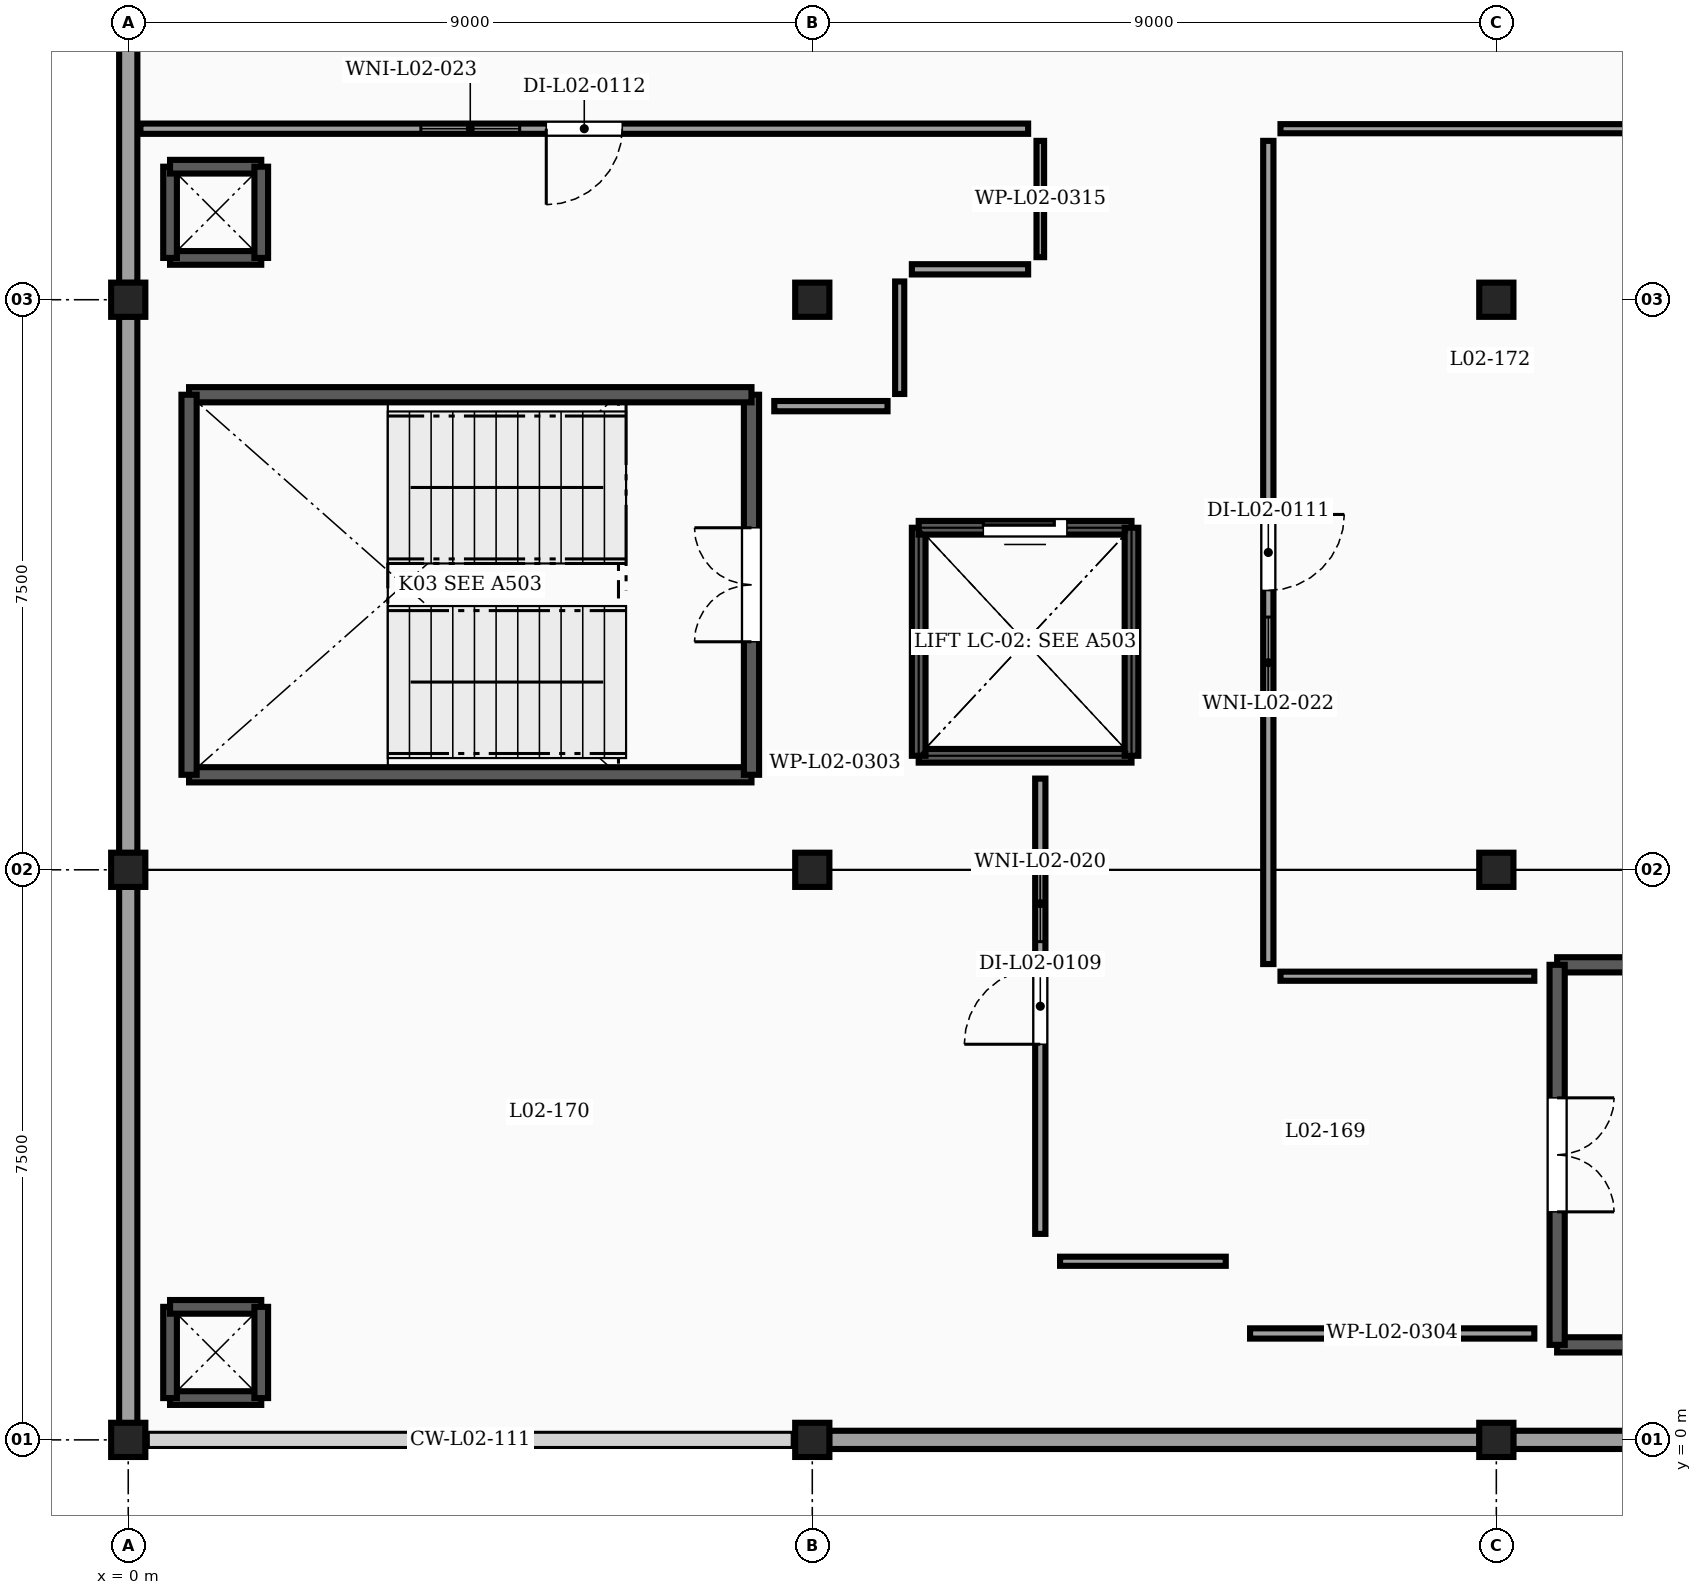
"""IFC4 building model, lengths in metres.
Left out: names, types, materials, properties, quantities, classifications, styles, units other than length and angle.
Written with IfcOpenShell. Run it as: python <this file> out.ifc"""

import sys

from ifc_helpers import new_model, si_unit, direction, frame, frame_2d, origin, origin_2d, place, context, subcontext, project, spatial, rectangle, extrude, element, fill, save


model = new_model("IFC4")
c1 = context("Model", 3, precision=1e-05, world=origin(), true_north=direction((0.0, 1.0)))
c2 = subcontext(c1, "Body", "Model", "MODEL_VIEW")
j1 = project(units=[si_unit("LENGTHUNIT", "METRE"), si_unit("PLANEANGLEUNIT", "RADIAN")], contexts=[c1])
p1 = place(None, origin())
s1 = spatial("IfcSite", under=j1, at=p1, CompositionType="ELEMENT")
p2 = place(p1, origin())
s2 = spatial("IfcBuilding", under=s1, at=p2, CompositionType="ELEMENT")
p3 = place(p2, frame((0.0, 0.0, 8.5)))
s3 = spatial("IfcBuildingStorey", under=s2, at=p3, CompositionType="ELEMENT", Elevation=8.5)
for number, where, z_axis, x_axis in (
    (1, (0.0, 0.0, 0.0), (0.0, 0.0, 1.0), (1.0, 0.0, 0.0)),
    (2, (9.0, 0.0, 0.0), (0.0, 0.0, 1.0), (1.0, 0.0, 0.0)),
    (3, (18.0, 0.0, 0.0), (0.0, 0.0, 1.0), (1.0, 0.0, 0.0)),
    (4, (0.0, 7.5, 0.0), (0.0, 0.0, 1.0), (1.0, 0.0, 0.0)),
    (5, (9.0, 7.5, 0.0), (0.0, 0.0, 1.0), (1.0, 0.0, 0.0)),
    (6, (18.0, 7.5, 0.0), (0.0, 0.0, 1.0), (1.0, 0.0, 0.0)),
    (7, (0.0, 15.0, 0.0), (0.0, 0.0, 1.0), (1.0, 0.0, 0.0)),
    (8, (9.0, 15.0, 0.0), (0.0, 0.0, 1.0), (1.0, 0.0, 0.0)),
    (9, (18.0, 15.0, 0.0), (0.0, 0.0, 1.0), (1.0, 0.0, 0.0)),
):
    element("IfcColumn", number, at=place(p3, frame(where, z_axis=z_axis, x_axis=x_axis)), inside=s3, PredefinedType="COLUMN", context=c2, shape_type="SweptSolid", body=[
        extrude(rectangle(XDim=0.45, YDim=0.45, at=origin_2d()), origin(), (0.0, 0.0, 1.0), 3.8),
    ])
for number, where, z_axis, x_axis in (
    (10, (26.779, 0.0, 0.0), (0.0, 0.0, 1.0), (-1.0, 0.0, 0.0)),
    (11, (17.779, 0.0, 0.0), (0.0, 0.0, 1.0), (-1.0, 0.0, 0.0)),
):
    element("IfcWall", number, at=place(p3, frame(where, z_axis=z_axis, x_axis=x_axis)), inside=s3, PredefinedType="SOLIDWALL", context=c2, shape_type="SweptSolid", body=[
        extrude(rectangle(XDim=8.558, YDim=0.24, at=frame_2d((4.279, 0.0))), origin(), (0.0, 0.0, 1.0), 3.23),
    ])
for number, where, z_axis, x_axis in (
    (12, (0.0, 0.221, 0.0), (0.0, 0.0, 1.0), (0.0, 1.0, 0.0)),
    (13, (0.0, 7.721, 0.0), (0.0, 0.0, 1.0), (0.0, 1.0, 0.0)),
    (14, (0.0, 15.221, 0.0), (0.0, 0.0, 1.0), (0.0, 1.0, 0.0)),
):
    element("IfcWall", number, at=place(p3, frame(where, z_axis=z_axis, x_axis=x_axis)), inside=s3, PredefinedType="SOLIDWALL", context=c2, shape_type="SweptSolid", body=[
        extrude(rectangle(XDim=7.058, YDim=0.24, at=frame_2d((3.529, 0.0))), origin(), (0.0, 0.0, 1.0), 3.23),
    ])
for number, where, z_axis, x_axis in (
    (15, (1.75, 0.55, 0.0), (0.0, 0.0, 1.0), (-1.0, 0.0, 0.0)),
    (16, (0.55, 0.55, 0.0), (0.0, 0.0, 1.0), (0.0, 1.0, 0.0)),
    (17, (0.55, 1.75, 0.0), (0.0, 0.0, 1.0), (1.0, 0.0, 0.0)),
    (18, (1.75, 1.75, 0.0), (0.0, 0.0, 1.0), (0.0, -1.0, 0.0)),
    (19, (1.75, 15.55, 0.0), (0.0, 0.0, 1.0), (-1.0, 0.0, 0.0)),
    (20, (0.55, 15.55, 0.0), (0.0, 0.0, 1.0), (0.0, 1.0, 0.0)),
    (21, (0.55, 16.75, 0.0), (0.0, 0.0, 1.0), (1.0, 0.0, 0.0)),
    (22, (1.75, 16.75, 0.0), (0.0, 0.0, 1.0), (0.0, -1.0, 0.0)),
):
    element("IfcWall", number, at=place(p3, frame(where, z_axis=z_axis, x_axis=x_axis)), inside=s3, PredefinedType="SHEAR", context=c2, shape_type="SweptSolid", body=[
        extrude(rectangle(XDim=1.2, YDim=0.18, at=frame_2d((0.6, 0.0))), origin(), (0.0, 0.0, 1.0), 3.59),
    ])
p4 = place(p3, frame((0.8, 8.75, 0.0), z_axis=(0.0, 0.0, 1.0), x_axis=(1.0, 0.0, 0.0)))
e23 = element("IfcWall", 23, at=p4, inside=s3, PredefinedType="SHEAR", context=c2, shape_type="SweptSolid", body=[
    extrude(rectangle(XDim=7.4, YDim=0.2, at=frame_2d((3.7, 0.0))), origin(), (0.0, 0.0, 1.0), 3.59),
])
p5 = place(p3, frame((8.2, 8.75, 0.0), z_axis=(0.0, 0.0, 1.0), x_axis=(0.0, 1.0, 0.0)))
e24 = element("IfcWall", 24, at=p5, inside=s3, PredefinedType="SHEAR", context=c2, shape_type="SweptSolid", body=[
    extrude(rectangle(XDim=5.0, YDim=0.2, at=frame_2d((2.5, 0.0))), origin(), (0.0, 0.0, 1.0), 3.59),
])
p6 = place(p5, frame((1.75, 0.0, 0.0)))
e25 = element("IfcOpeningElement", 25, at=p6, cuts=e24, PredefinedType="OPENING", context=c2, shape_type="SweptSolid", body=[
    extrude(rectangle(XDim=1.5, YDim=2.15, at=frame_2d((0.75, 1.075))), frame((0.0, 0.11, 0.0), z_axis=(0.0, -1.0, 0.0), x_axis=(1.0, 0.0, 0.0)), (0.0, 0.0, 1.0), 0.22),
])
p7 = place(p3, frame((8.2, 13.75, 0.0), z_axis=(0.0, 0.0, 1.0), x_axis=(-1.0, 0.0, 0.0)))
e26 = element("IfcWall", 26, at=p7, inside=s3, PredefinedType="SHEAR", context=c2, shape_type="SweptSolid", body=[
    extrude(rectangle(XDim=7.4, YDim=0.2, at=frame_2d((3.7, 0.0))), origin(), (0.0, 0.0, 1.0), 3.59),
])
p8 = place(p3, frame((0.8, 13.75, 0.0), z_axis=(0.0, 0.0, 1.0), x_axis=(0.0, -1.0, 0.0)))
e27 = element("IfcWall", 27, at=p8, inside=s3, PredefinedType="SHEAR", context=c2, shape_type="SweptSolid", body=[
    extrude(rectangle(XDim=5.0, YDim=0.2, at=frame_2d((2.5, 0.0))), origin(), (0.0, 0.0, 1.0), 3.59),
])
for number, where, z_axis, x_axis in (
    (28, (18.8, 1.25, 0.0), (0.0, 0.0, 1.0), (1.0, 0.0, 0.0)),
    (29, (26.2, 6.25, 0.0), (0.0, 0.0, 1.0), (-1.0, 0.0, 0.0)),
):
    element("IfcWall", number, at=place(p3, frame(where, z_axis=z_axis, x_axis=x_axis)), inside=s3, PredefinedType="SHEAR", context=c2, shape_type="SweptSolid", body=[
        extrude(rectangle(XDim=7.4, YDim=0.2, at=frame_2d((3.7, 0.0))), origin(), (0.0, 0.0, 1.0), 3.59),
    ])
p9 = place(p3, frame((18.8, 6.25, 0.0), z_axis=(0.0, 0.0, 1.0), x_axis=(0.0, -1.0, 0.0)))
e30 = element("IfcWall", 30, at=p9, inside=s3, PredefinedType="SHEAR", context=c2, shape_type="SweptSolid", body=[
    extrude(rectangle(XDim=5.0, YDim=0.2, at=frame_2d((2.5, 0.0))), origin(), (0.0, 0.0, 1.0), 3.59),
])
p10 = place(p9, frame((1.75, 0.0, 0.0)))
e31 = element("IfcOpeningElement", 31, at=p10, cuts=e30, PredefinedType="OPENING", context=c2, shape_type="SweptSolid", body=[
    extrude(rectangle(XDim=1.5, YDim=2.15, at=frame_2d((0.75, 1.075))), frame((0.0, 0.11, 0.0), z_axis=(0.0, -1.0, 0.0), x_axis=(1.0, 0.0, 0.0)), (0.0, 0.0, 1.0), 0.22),
])
p11 = place(p3, frame((13.2, 9.0, 0.0), z_axis=(0.0, 0.0, 1.0), x_axis=(-1.0, 0.0, 0.0)))
e32 = element("IfcWall", 32, at=p11, inside=s3, PredefinedType="SHEAR", context=c2, shape_type="SweptSolid", body=[
    extrude(rectangle(XDim=2.8, YDim=0.18, at=frame_2d((1.4, 0.0))), origin(), (0.0, 0.0, 1.0), 3.59),
])
p12 = place(p3, frame((10.4, 9.0, 0.0), z_axis=(0.0, 0.0, 1.0), x_axis=(0.0, 1.0, 0.0)))
e33 = element("IfcWall", 33, at=p12, inside=s3, PredefinedType="SHEAR", context=c2, shape_type="SweptSolid", body=[
    extrude(rectangle(XDim=3.0, YDim=0.18, at=frame_2d((1.5, 0.0))), origin(), (0.0, 0.0, 1.0), 3.59),
])
p13 = place(p3, frame((10.4, 12.0, 0.0), z_axis=(0.0, 0.0, 1.0), x_axis=(1.0, 0.0, 0.0)))
e34 = element("IfcWall", 34, at=p13, inside=s3, PredefinedType="SHEAR", context=c2, shape_type="SweptSolid", body=[
    extrude(rectangle(XDim=2.8, YDim=0.18, at=frame_2d((1.4, 0.0))), origin(), (0.0, 0.0, 1.0), 3.59),
])
p14 = place(p13, frame((0.85, 0.0, 0.0)))
e35 = element("IfcOpeningElement", 35, at=p14, cuts=e34, PredefinedType="OPENING", context=c2, shape_type="SweptSolid", body=[
    extrude(rectangle(XDim=1.1, YDim=2.15, at=frame_2d((0.55, 1.075))), frame((0.0, 0.1, 0.0), z_axis=(0.0, -1.0, 0.0), x_axis=(1.0, 0.0, 0.0)), (0.0, 0.0, 1.0), 0.2),
])
p15 = place(p3, frame((13.2, 12.0, 0.0), z_axis=(0.0, 0.0, 1.0), x_axis=(0.0, -1.0, 0.0)))
e36 = element("IfcWall", 36, at=p15, inside=s3, PredefinedType="SHEAR", context=c2, shape_type="SweptSolid", body=[
    extrude(rectangle(XDim=3.0, YDim=0.18, at=frame_2d((1.5, 0.0))), origin(), (0.0, 0.0, 1.0), 3.59),
])
p16 = place(p3, frame((10.1, 8.9, 0.0), z_axis=(0.0, 0.0, 1.0), x_axis=(-1.0, 0.0, 0.0)))
e37 = element("IfcWall", 37, at=p16, inside=s3, PredefinedType="PARTITIONING", context=c2, shape_type="SweptSolid", body=[
    extrude(rectangle(XDim=1.6, YDim=0.12, at=frame_2d((0.8, 0.0))), origin(), (0.0, 0.0, 1.0), 3.59),
])
p17 = place(p3, frame((18.5, 1.4, 0.0), z_axis=(0.0, 0.0, 1.0), x_axis=(-1.0, 0.0, 0.0)))
e38 = element("IfcWall", 38, at=p17, inside=s3, PredefinedType="PARTITIONING", context=c2, shape_type="SweptSolid", body=[
    extrude(rectangle(XDim=3.74, YDim=0.135, at=frame_2d((1.87, 0.0))), origin(), (0.0, 0.0, 1.0), 3.59),
])
p18 = place(p3, frame((14.44, 2.35, 0.0), z_axis=(0.0, 0.0, 1.0), x_axis=(-1.0, 0.0, 0.0)))
e39 = element("IfcWall", 39, at=p18, inside=s3, PredefinedType="PARTITIONING", context=c2, shape_type="SweptSolid", body=[
    extrude(rectangle(XDim=2.18, YDim=0.12, at=frame_2d((1.09, 0.0))), origin(), (0.0, 0.0, 1.0), 3.59),
])
p19 = place(p3, frame((12.0, 2.71, 0.0), z_axis=(0.0, 0.0, 1.0), x_axis=(0.0, 1.0, 0.0)))
e40 = element("IfcWall", 40, at=p19, inside=s3, PredefinedType="PARTITIONING", context=c2, shape_type="SweptSolid", body=[
    extrude(rectangle(XDim=5.99, YDim=0.135, at=frame_2d((2.995, 0.0))), origin(), (0.0, 0.0, 1.0), 3.182),
])
p20 = place(p19, frame((2.495, 0.0, 0.0)))
e41 = element("IfcOpeningElement", 41, at=p20, cuts=e40, PredefinedType="OPENING", context=c2, shape_type="SweptSolid", body=[
    extrude(rectangle(XDim=1.0, YDim=2.15, at=frame_2d((0.5, 1.075))), frame((0.0, 0.077, 0.0), z_axis=(0.0, -1.0, 0.0), x_axis=(1.0, 0.0, 0.0)), (0.0, 0.0, 1.0), 0.155),
])
p21 = place(p19, frame((3.845, 0.0, 1.02)))
e42 = element("IfcOpeningElement", 42, at=p21, cuts=e40, PredefinedType="OPENING", context=c2, shape_type="SweptSolid", body=[
    extrude(rectangle(XDim=1.0, YDim=1.08, at=frame_2d((0.5, 0.54))), frame((0.0, 0.077, 0.0), z_axis=(0.0, -1.0, 0.0), x_axis=(1.0, 0.0, 0.0)), (0.0, 0.0, 1.0), 0.155),
])
p22 = place(p3, frame((20.84, 17.25, 0.0), z_axis=(0.0, 0.0, 1.0), x_axis=(-1.0, 0.0, 0.0)))
e43 = element("IfcWall", 43, at=p22, inside=s3, PredefinedType="PARTITIONING", context=c2, shape_type="SweptSolid", body=[
    extrude(rectangle(XDim=5.68, YDim=0.12, at=frame_2d((2.84, 0.0))), origin(), (0.0, 0.0, 1.0), 3.59),
])
p23 = place(p3, frame((15.0, 17.09, 0.0), z_axis=(0.0, 0.0, 1.0), x_axis=(0.0, -1.0, 0.0)))
e44 = element("IfcWall", 44, at=p23, inside=s3, PredefinedType="PARTITIONING", context=c2, shape_type="SweptSolid", body=[
    extrude(rectangle(XDim=10.83, YDim=0.135, at=frame_2d((5.415, 0.0))), origin(), (0.0, 0.0, 1.0), 3.182),
])
p24 = place(p23, frame((4.915, 0.0, 0.0)))
e45 = element("IfcOpeningElement", 45, at=p24, cuts=e44, PredefinedType="OPENING", context=c2, shape_type="SweptSolid", body=[
    extrude(rectangle(XDim=1.0, YDim=2.15, at=frame_2d((0.5, 1.075))), frame((0.0, 0.077, 0.0), z_axis=(0.0, -1.0, 0.0), x_axis=(1.0, 0.0, 0.0)), (0.0, 0.0, 1.0), 0.155),
])
p25 = place(p23, frame((6.265, 0.0, 1.02)))
e46 = element("IfcOpeningElement", 46, at=p25, cuts=e44, PredefinedType="OPENING", context=c2, shape_type="SweptSolid", body=[
    extrude(rectangle(XDim=1.2, YDim=1.15, at=frame_2d((0.6, 0.575))), frame((0.0, 0.077, 0.0), z_axis=(0.0, -1.0, 0.0), x_axis=(1.0, 0.0, 0.0)), (0.0, 0.0, 1.0), 0.155),
])
p26 = place(p3, frame((15.16, 6.1, 0.0), z_axis=(0.0, 0.0, 1.0), x_axis=(1.0, 0.0, 0.0)))
e47 = element("IfcWall", 47, at=p26, inside=s3, PredefinedType="PARTITIONING", context=c2, shape_type="SweptSolid", body=[
    extrude(rectangle(XDim=3.34, YDim=0.12, at=frame_2d((1.67, 0.0))), origin(), (0.0, 0.0, 1.0), 3.59),
])
p27 = place(p3, frame((8.5, 13.6, 0.0), z_axis=(0.0, 0.0, 1.0), x_axis=(1.0, 0.0, 0.0)))
e48 = element("IfcWall", 48, at=p27, inside=s3, PredefinedType="PARTITIONING", context=c2, shape_type="SweptSolid", body=[
    extrude(rectangle(XDim=1.49, YDim=0.135, at=frame_2d((0.745, 0.0))), origin(), (0.0, 0.0, 1.0), 3.59),
])
p28 = place(p3, frame((10.15, 13.76, 0.0), z_axis=(0.0, 0.0, 1.0), x_axis=(0.0, 1.0, 0.0)))
e49 = element("IfcWall", 49, at=p28, inside=s3, PredefinedType="PARTITIONING", context=c2, shape_type="SweptSolid", body=[
    extrude(rectangle(XDim=1.48, YDim=0.12, at=frame_2d((0.74, 0.0))), origin(), (0.0, 0.0, 1.0), 3.59),
])
p29 = place(p3, frame((10.31, 15.4, 0.0), z_axis=(0.0, 0.0, 1.0), x_axis=(1.0, 0.0, 0.0)))
e50 = element("IfcWall", 50, at=p29, inside=s3, PredefinedType="PARTITIONING", context=c2, shape_type="SweptSolid", body=[
    extrude(rectangle(XDim=1.53, YDim=0.135, at=frame_2d((0.765, 0.0))), origin(), (0.0, 0.0, 1.0), 3.59),
])
p30 = place(p3, frame((12.0, 15.56, 0.0), z_axis=(0.0, 0.0, 1.0), x_axis=(0.0, 1.0, 0.0)))
e51 = element("IfcWall", 51, at=p30, inside=s3, PredefinedType="PARTITIONING", context=c2, shape_type="SweptSolid", body=[
    extrude(rectangle(XDim=1.53, YDim=0.1, at=frame_2d((0.765, 0.0))), origin(), (0.0, 0.0, 1.0), 3.182),
])
p31 = place(p3, frame((11.84, 17.25, 0.0), z_axis=(0.0, 0.0, 1.0), x_axis=(-1.0, 0.0, 0.0)))
e52 = element("IfcWall", 52, at=p31, inside=s3, PredefinedType="PARTITIONING", context=c2, shape_type="SweptSolid", body=[
    extrude(rectangle(XDim=11.68, YDim=0.135, at=frame_2d((5.84, 0.0))), origin(), (0.0, 0.0, 1.0), 3.59),
])
p32 = place(p31, frame((5.34, 0.0, 0.0)))
e53 = element("IfcOpeningElement", 53, at=p32, cuts=e52, PredefinedType="OPENING", context=c2, shape_type="SweptSolid", body=[
    extrude(rectangle(XDim=1.0, YDim=2.15, at=frame_2d((0.5, 1.075))), frame((0.0, 0.077, 0.0), z_axis=(0.0, -1.0, 0.0), x_axis=(1.0, 0.0, 0.0)), (0.0, 0.0, 1.0), 0.155),
])
p33 = place(p31, frame((6.69, 0.0, 1.02)))
e54 = element("IfcOpeningElement", 54, at=p33, cuts=e52, PredefinedType="OPENING", context=c2, shape_type="SweptSolid", body=[
    extrude(rectangle(XDim=1.3, YDim=1.18, at=frame_2d((0.65, 0.59))), frame((0.0, 0.077, 0.0), z_axis=(0.0, -1.0, 0.0), x_axis=(1.0, 0.0, 0.0)), (0.0, 0.0, 1.0), 0.155),
])
p34 = place(p6, origin())
e55 = element("IfcDoor", 55, at=p34, inside=s3, OperationType="DOUBLE_DOOR_SINGLE_SWING", PredefinedType="DOOR", context=c2, shape_type="SweptSolid", body=[
    extrude(rectangle(XDim=1.5, YDim=2.15, at=frame_2d((0.75, 1.075))), frame((0.0, 0.025, 0.0), z_axis=(0.0, -1.0, 0.0), x_axis=(1.0, 0.0, 0.0)), (0.0, 0.0, 1.0), 0.05),
])
fill(e25, e55)
p35 = place(p10, origin())
e56 = element("IfcDoor", 56, at=p35, inside=s3, OperationType="DOUBLE_DOOR_SINGLE_SWING", PredefinedType="DOOR", context=c2, shape_type="SweptSolid", body=[
    extrude(rectangle(XDim=1.5, YDim=2.15, at=frame_2d((0.75, 1.075))), frame((0.0, 0.025, 0.0), z_axis=(0.0, -1.0, 0.0), x_axis=(1.0, 0.0, 0.0)), (0.0, 0.0, 1.0), 0.05),
])
fill(e31, e56)
p36 = place(p14, origin())
e57 = element("IfcDoor", 57, at=p36, inside=s3, OperationType="SLIDING_TO_LEFT", PredefinedType="DOOR", context=c2, shape_type="SweptSolid", body=[
    extrude(rectangle(XDim=1.1, YDim=2.15, at=frame_2d((0.55, 1.075))), frame((0.0, 0.025, 0.0), z_axis=(0.0, -1.0, 0.0), x_axis=(1.0, 0.0, 0.0)), (0.0, 0.0, 1.0), 0.05),
])
fill(e35, e57)
p37 = place(p20, origin())
e58 = element("IfcDoor", 58, at=p37, inside=s3, OperationType="SINGLE_SWING_LEFT", PredefinedType="DOOR", context=c2, shape_type="SweptSolid", body=[
    extrude(rectangle(XDim=1.0, YDim=2.15, at=frame_2d((0.5, 1.075))), frame((0.0, 0.025, 0.0), z_axis=(0.0, -1.0, 0.0), x_axis=(1.0, 0.0, 0.0)), (0.0, 0.0, 1.0), 0.05),
])
fill(e41, e58)
p38 = place(p21, origin())
e59 = element("IfcWindow", 59, at=p38, inside=s3, PartitioningType="DOUBLE_PANEL_VERTICAL", PredefinedType="WINDOW", context=c2, shape_type="SweptSolid", body=[
    extrude(rectangle(XDim=1.0, YDim=1.08, at=frame_2d((0.5, 0.54))), frame((0.0, 0.03, 0.0), z_axis=(0.0, -1.0, 0.0), x_axis=(1.0, 0.0, 0.0)), (0.0, 0.0, 1.0), 0.06),
])
fill(e42, e59)
p39 = place(p24, origin())
e60 = element("IfcDoor", 60, at=p39, inside=s3, OperationType="SINGLE_SWING_LEFT", PredefinedType="DOOR", context=c2, shape_type="SweptSolid", body=[
    extrude(rectangle(XDim=1.0, YDim=2.15, at=frame_2d((0.5, 1.075))), frame((0.0, 0.025, 0.0), z_axis=(0.0, -1.0, 0.0), x_axis=(1.0, 0.0, 0.0)), (0.0, 0.0, 1.0), 0.05),
])
fill(e45, e60)
p40 = place(p25, origin())
e61 = element("IfcWindow", 61, at=p40, inside=s3, PartitioningType="DOUBLE_PANEL_VERTICAL", PredefinedType="WINDOW", context=c2, shape_type="SweptSolid", body=[
    extrude(rectangle(XDim=1.2, YDim=1.15, at=frame_2d((0.6, 0.575))), frame((0.0, 0.03, 0.0), z_axis=(0.0, -1.0, 0.0), x_axis=(1.0, 0.0, 0.0)), (0.0, 0.0, 1.0), 0.06),
])
fill(e46, e61)
p41 = place(p32, origin())
e62 = element("IfcDoor", 62, at=p41, inside=s3, OperationType="SINGLE_SWING_RIGHT", PredefinedType="DOOR", context=c2, shape_type="SweptSolid", body=[
    extrude(rectangle(XDim=1.0, YDim=2.15, at=frame_2d((0.5, 1.075))), frame((0.0, 0.025, 0.0), z_axis=(0.0, -1.0, 0.0), x_axis=(1.0, 0.0, 0.0)), (0.0, 0.0, 1.0), 0.05),
])
fill(e53, e62)
p42 = place(p33, origin())
e63 = element("IfcWindow", 63, at=p42, inside=s3, PartitioningType="DOUBLE_PANEL_VERTICAL", PredefinedType="WINDOW", context=c2, shape_type="SweptSolid", body=[
    extrude(rectangle(XDim=1.3, YDim=1.18, at=frame_2d((0.65, 0.59))), frame((0.0, 0.03, 0.0), z_axis=(0.0, -1.0, 0.0), x_axis=(1.0, 0.0, 0.0)), (0.0, 0.0, 1.0), 0.06),
])
fill(e54, e63)
save(model, sys.argv[1])
